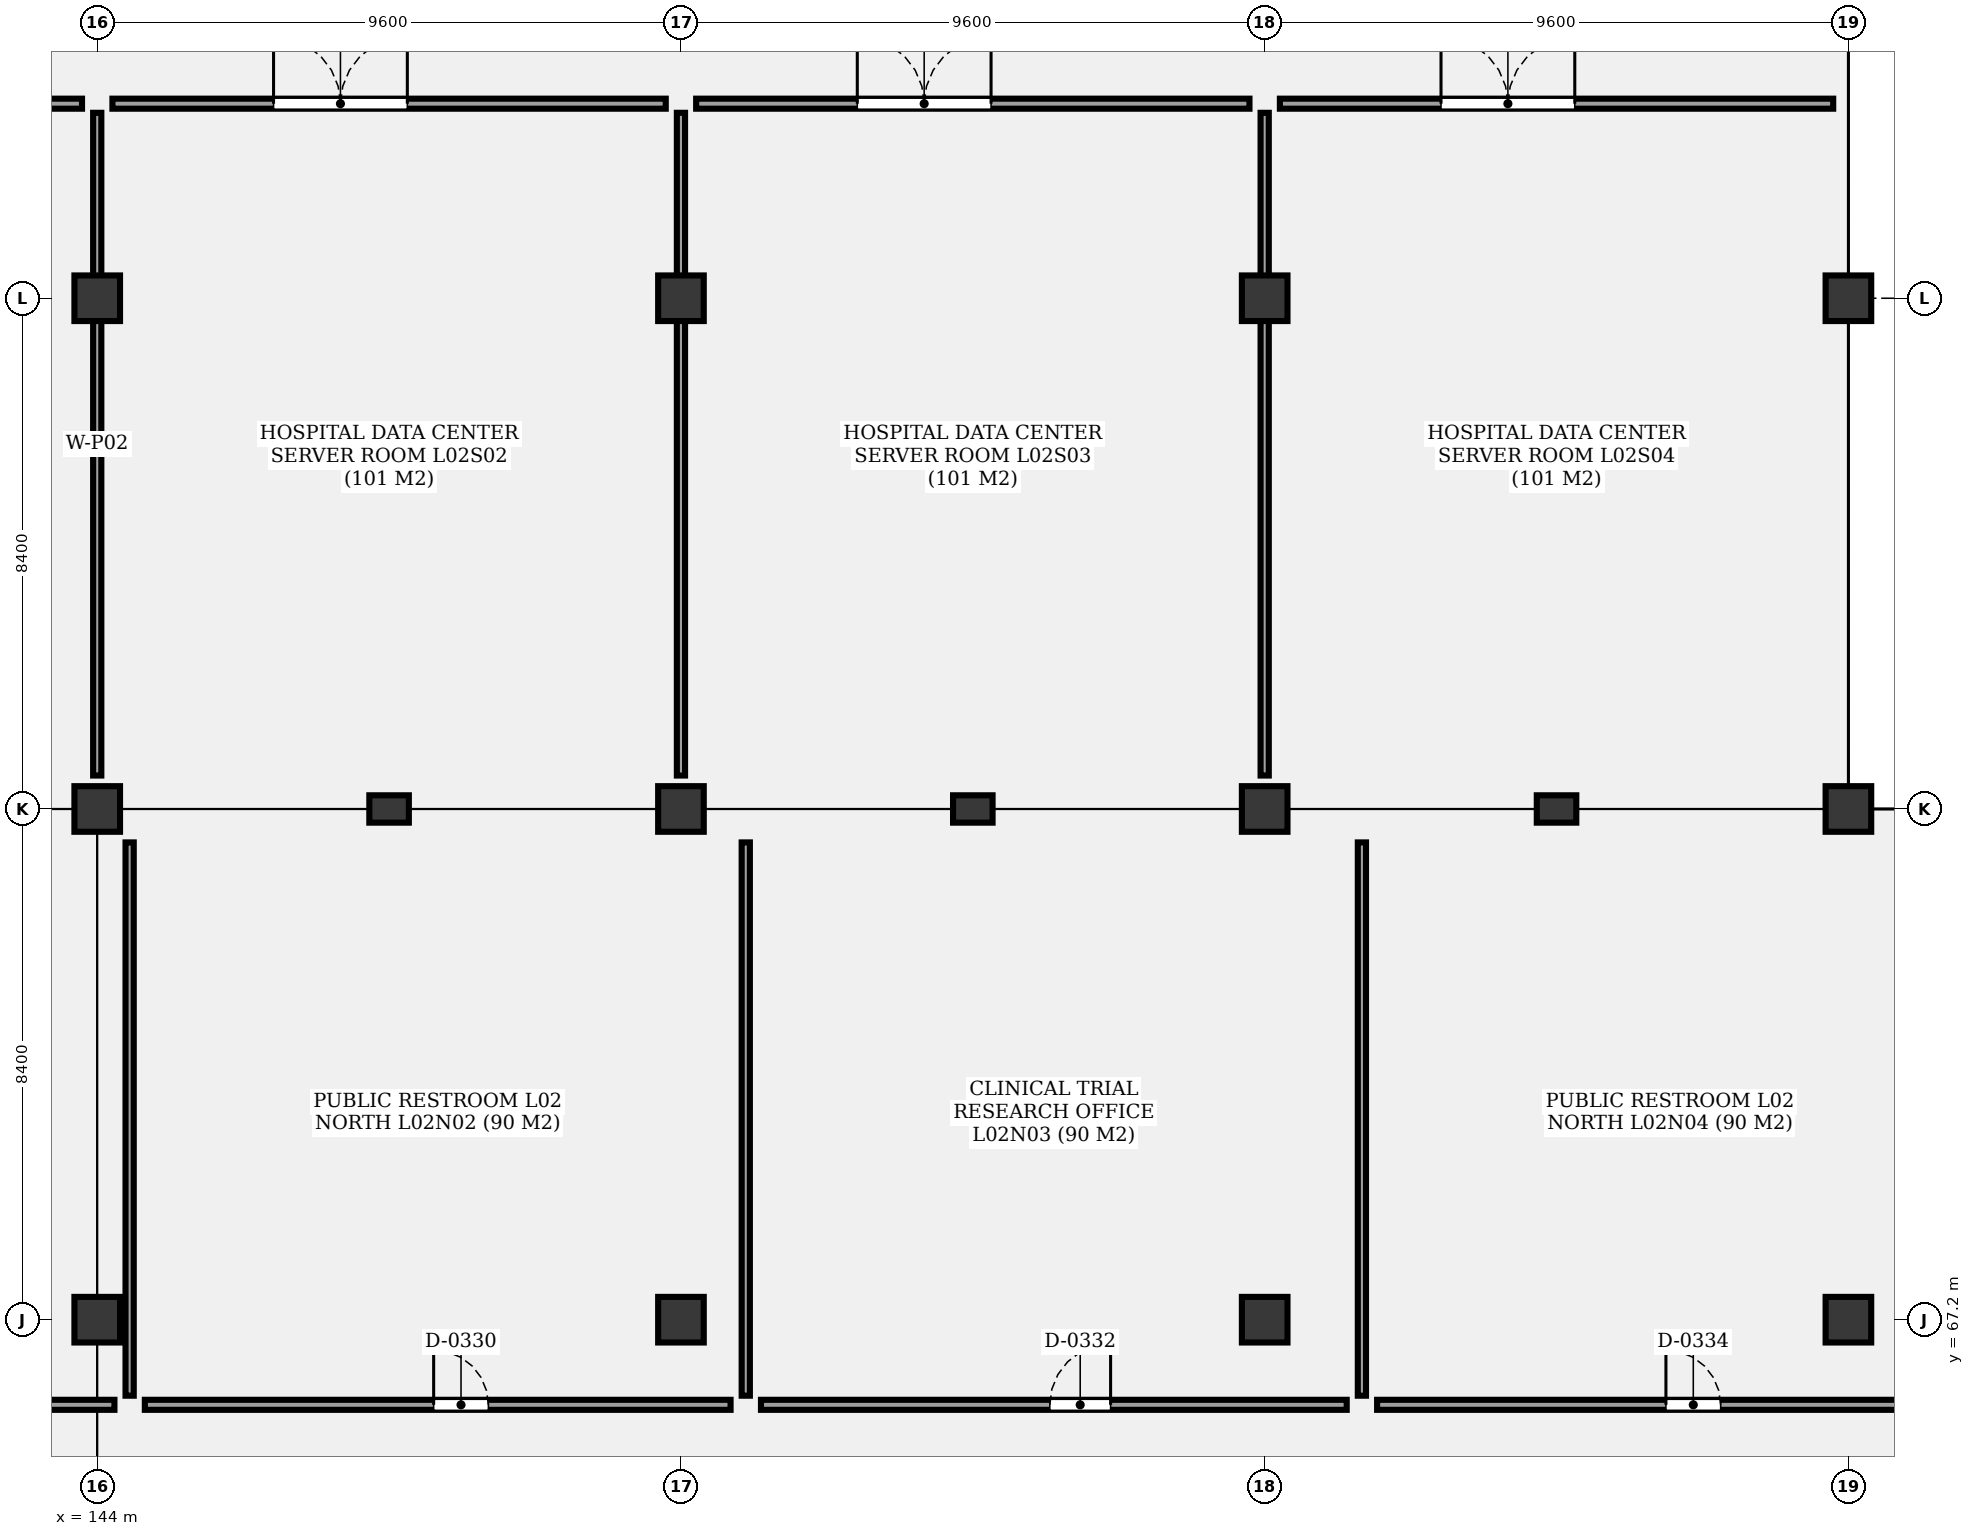
"""IFC4 building model, lengths in metres.
Left out: names, types, materials, properties, quantities, classifications, styles, units other than length and angle.
Written with IfcOpenShell. Run it as: python <this file> out.ifc"""

import sys

from ifc_helpers import new_model, si_unit, direction, frame, frame_2d, origin, origin_2d, place, context, subcontext, project, spatial, rectangle, extrude, element, fill, save


model = new_model("IFC4")
c1 = context("Model", 3, precision=1e-05, world=origin(), true_north=direction((0.0, 1.0)))
c2 = subcontext(c1, "Body", "Model", "MODEL_VIEW")
j1 = project(units=[si_unit("LENGTHUNIT", "METRE"), si_unit("PLANEANGLEUNIT", "RADIAN")], contexts=[c1])
p1 = place(None, origin())
s1 = spatial("IfcSite", under=j1, at=p1, CompositionType="ELEMENT")
p2 = place(p1, origin())
s2 = spatial("IfcBuilding", under=s1, at=p2, CompositionType="ELEMENT")
p3 = place(p2, frame((0.0, 0.0, 9.9)))
s3 = spatial("IfcBuildingStorey", under=s2, at=p3, CompositionType="ELEMENT", Elevation=9.9)
for number, where, z_axis, x_axis in (
    (1, (144.0, 67.2, 0.0), (0.0, 0.0, 1.0), (1.0, 0.0, 0.0)),
    (2, (144.0, 75.6, 0.0), (0.0, 0.0, 1.0), (1.0, 0.0, 0.0)),
    (3, (144.0, 84.0, 0.0), (0.0, 0.0, 1.0), (1.0, 0.0, 0.0)),
    (4, (153.6, 67.2, 0.0), (0.0, 0.0, 1.0), (1.0, 0.0, 0.0)),
    (5, (153.6, 75.6, 0.0), (0.0, 0.0, 1.0), (1.0, 0.0, 0.0)),
    (6, (153.6, 84.0, 0.0), (0.0, 0.0, 1.0), (1.0, 0.0, 0.0)),
    (7, (163.2, 67.2, 0.0), (0.0, 0.0, 1.0), (1.0, 0.0, 0.0)),
    (8, (163.2, 75.6, 0.0), (0.0, 0.0, 1.0), (1.0, 0.0, 0.0)),
    (9, (163.2, 84.0, 0.0), (0.0, 0.0, 1.0), (1.0, 0.0, 0.0)),
    (10, (172.8, 67.2, 0.0), (0.0, 0.0, 1.0), (1.0, 0.0, 0.0)),
    (11, (172.8, 75.6, 0.0), (0.0, 0.0, 1.0), (1.0, 0.0, 0.0)),
    (12, (172.8, 84.0, 0.0), (0.0, 0.0, 1.0), (1.0, 0.0, 0.0)),
):
    element("IfcColumn", number, at=place(p3, frame(where, z_axis=z_axis, x_axis=x_axis)), inside=s3, PredefinedType="COLUMN", context=c2, shape_type="SweptSolid", body=[
        extrude(rectangle(XDim=0.75, YDim=0.75, at=origin_2d()), origin(), (0.0, 0.0, 1.0), 3.6),
    ])
for number, where, z_axis, x_axis in (
    (13, (148.8, 75.6, 0.0), (0.0, 0.0, 1.0), (1.0, 0.0, 0.0)),
    (14, (158.4, 75.6, 0.0), (0.0, 0.0, 1.0), (1.0, 0.0, 0.0)),
    (15, (168.0, 75.6, 0.0), (0.0, 0.0, 1.0), (1.0, 0.0, 0.0)),
):
    element("IfcColumn", number, at=place(p3, frame(where, z_axis=z_axis, x_axis=x_axis)), inside=s3, PredefinedType="PILASTER", context=c2, shape_type="SweptSolid", body=[
        extrude(rectangle(XDim=0.65, YDim=0.45, at=origin_2d()), origin(), (0.0, 0.0, 1.0), 3.6),
    ])
p4 = place(p3, frame((134.65, 87.2, 0.0), z_axis=(0.0, 0.0, 1.0), x_axis=(1.0, 0.0, 0.0)))
e16 = element("IfcWall", 16, at=p4, inside=s3, PredefinedType="PARTITIONING", context=c2, shape_type="SweptSolid", body=[
    extrude(rectangle(XDim=9.1, YDim=0.165, at=frame_2d((4.55, 0.0))), origin(), (0.0, 0.0, 1.0), 2.48),
])
p5 = place(p4, frame((2.65, 0.0, 0.0)))
e17 = element("IfcOpeningElement", 17, at=p5, cuts=e16, PredefinedType="OPENING", context=c2, shape_type="SweptSolid", body=[
    extrude(rectangle(XDim=2.2, YDim=2.4, at=frame_2d((1.1, 1.2))), frame((0.0, 0.093, 0.0), z_axis=(0.0, -1.0, 0.0), x_axis=(1.0, 0.0, 0.0)), (0.0, 0.0, 1.0), 0.185),
])
p6 = place(p3, frame((144.25, 87.2, 0.0), z_axis=(0.0, 0.0, 1.0), x_axis=(1.0, 0.0, 0.0)))
e18 = element("IfcWall", 18, at=p6, inside=s3, PredefinedType="PARTITIONING", context=c2, shape_type="SweptSolid", body=[
    extrude(rectangle(XDim=9.1, YDim=0.165, at=frame_2d((4.55, 0.0))), origin(), (0.0, 0.0, 1.0), 2.48),
])
p7 = place(p6, frame((2.65, 0.0, 0.0)))
e19 = element("IfcOpeningElement", 19, at=p7, cuts=e18, PredefinedType="OPENING", context=c2, shape_type="SweptSolid", body=[
    extrude(rectangle(XDim=2.2, YDim=2.4, at=frame_2d((1.1, 1.2))), frame((0.0, 0.093, 0.0), z_axis=(0.0, -1.0, 0.0), x_axis=(1.0, 0.0, 0.0)), (0.0, 0.0, 1.0), 0.185),
])
p8 = place(p3, frame((144.0, 76.15, 0.0), z_axis=(0.0, 0.0, 1.0), x_axis=(0.0, 1.0, 0.0)))
e20 = element("IfcWall", 20, at=p8, inside=s3, PredefinedType="PARTITIONING", context=c2, shape_type="SweptSolid", body=[
    extrude(rectangle(XDim=10.9, YDim=0.135, at=frame_2d((5.45, 0.0))), origin(), (0.0, 0.0, 1.0), 2.48),
])
p9 = place(p3, frame((153.85, 87.2, 0.0), z_axis=(0.0, 0.0, 1.0), x_axis=(1.0, 0.0, 0.0)))
e21 = element("IfcWall", 21, at=p9, inside=s3, PredefinedType="PARTITIONING", context=c2, shape_type="SweptSolid", body=[
    extrude(rectangle(XDim=9.1, YDim=0.165, at=frame_2d((4.55, 0.0))), origin(), (0.0, 0.0, 1.0), 2.48),
])
p10 = place(p9, frame((2.65, 0.0, 0.0)))
e22 = element("IfcOpeningElement", 22, at=p10, cuts=e21, PredefinedType="OPENING", context=c2, shape_type="SweptSolid", body=[
    extrude(rectangle(XDim=2.2, YDim=2.4, at=frame_2d((1.1, 1.2))), frame((0.0, 0.093, 0.0), z_axis=(0.0, -1.0, 0.0), x_axis=(1.0, 0.0, 0.0)), (0.0, 0.0, 1.0), 0.185),
])
p11 = place(p3, frame((153.6, 76.15, 0.0), z_axis=(0.0, 0.0, 1.0), x_axis=(0.0, 1.0, 0.0)))
e23 = element("IfcWall", 23, at=p11, inside=s3, PredefinedType="PARTITIONING", context=c2, shape_type="SweptSolid", body=[
    extrude(rectangle(XDim=10.9, YDim=0.135, at=frame_2d((5.45, 0.0))), origin(), (0.0, 0.0, 1.0), 2.48),
])
p12 = place(p3, frame((163.45, 87.2, 0.0), z_axis=(0.0, 0.0, 1.0), x_axis=(1.0, 0.0, 0.0)))
e24 = element("IfcWall", 24, at=p12, inside=s3, PredefinedType="PARTITIONING", context=c2, shape_type="SweptSolid", body=[
    extrude(rectangle(XDim=9.1, YDim=0.165, at=frame_2d((4.55, 0.0))), origin(), (0.0, 0.0, 1.0), 2.48),
])
p13 = place(p12, frame((2.65, 0.0, 0.0)))
e25 = element("IfcOpeningElement", 25, at=p13, cuts=e24, PredefinedType="OPENING", context=c2, shape_type="SweptSolid", body=[
    extrude(rectangle(XDim=2.2, YDim=2.4, at=frame_2d((1.1, 1.2))), frame((0.0, 0.093, 0.0), z_axis=(0.0, -1.0, 0.0), x_axis=(1.0, 0.0, 0.0)), (0.0, 0.0, 1.0), 0.185),
])
p14 = place(p3, frame((163.2, 76.15, 0.0), z_axis=(0.0, 0.0, 1.0), x_axis=(0.0, 1.0, 0.0)))
e26 = element("IfcWall", 26, at=p14, inside=s3, PredefinedType="PARTITIONING", context=c2, shape_type="SweptSolid", body=[
    extrude(rectangle(XDim=10.9, YDim=0.135, at=frame_2d((5.45, 0.0))), origin(), (0.0, 0.0, 1.0), 2.48),
])
p15 = place(p3, frame((134.65, 65.8, 0.0), z_axis=(0.0, 0.0, 1.0), x_axis=(1.0, 0.0, 0.0)))
e27 = element("IfcWall", 27, at=p15, inside=s3, PredefinedType="PARTITIONING", context=c2, shape_type="SweptSolid", body=[
    extrude(rectangle(XDim=9.633, YDim=0.165, at=frame_2d((4.816, 0.0))), origin(), (0.0, 0.0, 1.0), 2.48),
])
p16 = place(p15, frame((4.75, 0.0, 0.0)))
e28 = element("IfcOpeningElement", 28, at=p16, cuts=e27, PredefinedType="OPENING", context=c2, shape_type="SweptSolid", body=[
    extrude(rectangle(XDim=1.0, YDim=2.2, at=frame_2d((0.5, 1.1))), frame((0.0, 0.093, 0.0), z_axis=(0.0, -1.0, 0.0), x_axis=(1.0, 0.0, 0.0)), (0.0, 0.0, 1.0), 0.185),
])
p17 = place(p3, frame((144.783, 65.8, 0.0), z_axis=(0.0, 0.0, 1.0), x_axis=(1.0, 0.0, 0.0)))
e29 = element("IfcWall", 29, at=p17, inside=s3, PredefinedType="PARTITIONING", context=c2, shape_type="SweptSolid", body=[
    extrude(rectangle(XDim=9.633, YDim=0.165, at=frame_2d((4.816, 0.0))), origin(), (0.0, 0.0, 1.0), 2.48),
])
p18 = place(p17, frame((4.75, 0.0, 0.0)))
e30 = element("IfcOpeningElement", 30, at=p18, cuts=e29, PredefinedType="OPENING", context=c2, shape_type="SweptSolid", body=[
    extrude(rectangle(XDim=0.9, YDim=2.1, at=frame_2d((0.45, 1.05))), frame((0.0, 0.093, 0.0), z_axis=(0.0, -1.0, 0.0), x_axis=(1.0, 0.0, 0.0)), (0.0, 0.0, 1.0), 0.185),
])
p19 = place(p3, frame((144.533, 65.95, 0.0), z_axis=(0.0, 0.0, 1.0), x_axis=(0.0, 1.0, 0.0)))
e31 = element("IfcWall", 31, at=p19, inside=s3, PredefinedType="PARTITIONING", context=c2, shape_type="SweptSolid", body=[
    extrude(rectangle(XDim=9.1, YDim=0.135, at=frame_2d((4.55, 0.0))), origin(), (0.0, 0.0, 1.0), 2.48),
])
p20 = place(p3, frame((154.916, 65.8, 0.0), z_axis=(0.0, 0.0, 1.0), x_axis=(1.0, 0.0, 0.0)))
e32 = element("IfcWall", 32, at=p20, inside=s3, PredefinedType="PARTITIONING", context=c2, shape_type="SweptSolid", body=[
    extrude(rectangle(XDim=9.633, YDim=0.165, at=frame_2d((4.816, 0.0))), origin(), (0.0, 0.0, 1.0), 2.48),
])
p21 = place(p20, frame((4.75, 0.0, 0.0)))
e33 = element("IfcOpeningElement", 33, at=p21, cuts=e32, PredefinedType="OPENING", context=c2, shape_type="SweptSolid", body=[
    extrude(rectangle(XDim=1.0, YDim=2.2, at=frame_2d((0.5, 1.1))), frame((0.0, 0.093, 0.0), z_axis=(0.0, -1.0, 0.0), x_axis=(1.0, 0.0, 0.0)), (0.0, 0.0, 1.0), 0.185),
])
p22 = place(p3, frame((154.666, 65.95, 0.0), z_axis=(0.0, 0.0, 1.0), x_axis=(0.0, 1.0, 0.0)))
e34 = element("IfcWall", 34, at=p22, inside=s3, PredefinedType="PARTITIONING", context=c2, shape_type="SweptSolid", body=[
    extrude(rectangle(XDim=9.1, YDim=0.135, at=frame_2d((4.55, 0.0))), origin(), (0.0, 0.0, 1.0), 2.48),
])
p23 = place(p3, frame((165.049, 65.8, 0.0), z_axis=(0.0, 0.0, 1.0), x_axis=(1.0, 0.0, 0.0)))
e35 = element("IfcWall", 35, at=p23, inside=s3, PredefinedType="PARTITIONING", context=c2, shape_type="SweptSolid", body=[
    extrude(rectangle(XDim=9.633, YDim=0.165, at=frame_2d((4.816, 0.0))), origin(), (0.0, 0.0, 1.0), 2.48),
])
p24 = place(p23, frame((4.75, 0.0, 0.0)))
e36 = element("IfcOpeningElement", 36, at=p24, cuts=e35, PredefinedType="OPENING", context=c2, shape_type="SweptSolid", body=[
    extrude(rectangle(XDim=0.9, YDim=2.1, at=frame_2d((0.45, 1.05))), frame((0.0, 0.093, 0.0), z_axis=(0.0, -1.0, 0.0), x_axis=(1.0, 0.0, 0.0)), (0.0, 0.0, 1.0), 0.185),
])
p25 = place(p3, frame((164.799, 65.95, 0.0), z_axis=(0.0, 0.0, 1.0), x_axis=(0.0, 1.0, 0.0)))
e37 = element("IfcWall", 37, at=p25, inside=s3, PredefinedType="PARTITIONING", context=c2, shape_type="SweptSolid", body=[
    extrude(rectangle(XDim=9.1, YDim=0.135, at=frame_2d((4.55, 0.0))), origin(), (0.0, 0.0, 1.0), 2.48),
])
p26 = place(p7, origin())
e38 = element("IfcDoor", 38, at=p26, inside=s3, OperationType="DOUBLE_DOOR_SINGLE_SWING", PredefinedType="DOOR", context=c2, shape_type="SweptSolid", body=[
    extrude(rectangle(XDim=2.2, YDim=2.4, at=frame_2d((1.1, 1.2))), frame((0.0, 0.025, 0.0), z_axis=(0.0, -1.0, 0.0), x_axis=(1.0, 0.0, 0.0)), (0.0, 0.0, 1.0), 0.05),
])
fill(e19, e38)
p27 = place(p10, origin())
e39 = element("IfcDoor", 39, at=p27, inside=s3, OperationType="DOUBLE_DOOR_SINGLE_SWING", PredefinedType="DOOR", context=c2, shape_type="SweptSolid", body=[
    extrude(rectangle(XDim=2.2, YDim=2.4, at=frame_2d((1.1, 1.2))), frame((0.0, 0.025, 0.0), z_axis=(0.0, -1.0, 0.0), x_axis=(1.0, 0.0, 0.0)), (0.0, 0.0, 1.0), 0.05),
])
fill(e22, e39)
p28 = place(p13, origin())
e40 = element("IfcDoor", 40, at=p28, inside=s3, OperationType="DOUBLE_DOOR_SINGLE_SWING", PredefinedType="DOOR", context=c2, shape_type="SweptSolid", body=[
    extrude(rectangle(XDim=2.2, YDim=2.4, at=frame_2d((1.1, 1.2))), frame((0.0, 0.025, 0.0), z_axis=(0.0, -1.0, 0.0), x_axis=(1.0, 0.0, 0.0)), (0.0, 0.0, 1.0), 0.05),
])
fill(e25, e40)
p29 = place(p18, origin())
e41 = element("IfcDoor", 41, at=p29, inside=s3, OperationType="SINGLE_SWING_LEFT", PredefinedType="DOOR", context=c2, shape_type="SweptSolid", body=[
    extrude(rectangle(XDim=0.9, YDim=2.1, at=frame_2d((0.45, 1.05))), frame((0.0, 0.025, 0.0), z_axis=(0.0, -1.0, 0.0), x_axis=(1.0, 0.0, 0.0)), (0.0, 0.0, 1.0), 0.05),
])
fill(e30, e41)
p30 = place(p21, origin())
e42 = element("IfcDoor", 42, at=p30, inside=s3, OperationType="SINGLE_SWING_RIGHT", PredefinedType="DOOR", context=c2, shape_type="SweptSolid", body=[
    extrude(rectangle(XDim=1.0, YDim=2.2, at=frame_2d((0.5, 1.1))), frame((0.0, 0.025, 0.0), z_axis=(0.0, -1.0, 0.0), x_axis=(1.0, 0.0, 0.0)), (0.0, 0.0, 1.0), 0.05),
])
fill(e33, e42)
p31 = place(p24, origin())
e43 = element("IfcDoor", 43, at=p31, inside=s3, OperationType="SINGLE_SWING_LEFT", PredefinedType="DOOR", context=c2, shape_type="SweptSolid", body=[
    extrude(rectangle(XDim=0.9, YDim=2.1, at=frame_2d((0.45, 1.05))), frame((0.0, 0.025, 0.0), z_axis=(0.0, -1.0, 0.0), x_axis=(1.0, 0.0, 0.0)), (0.0, 0.0, 1.0), 0.05),
])
fill(e36, e43)
save(model, sys.argv[1])
